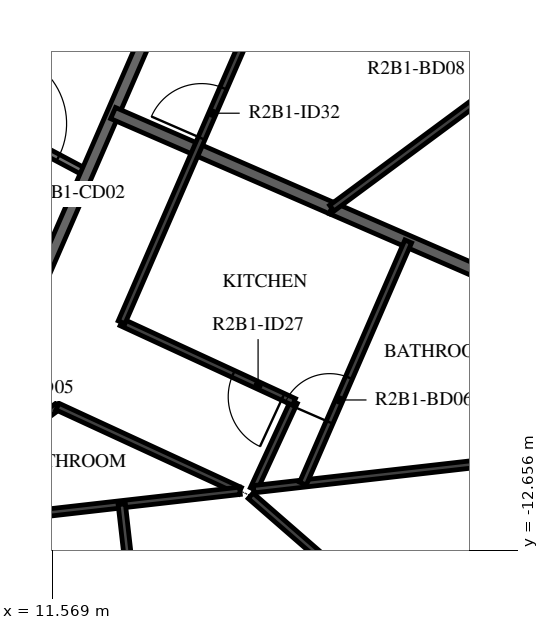
"""IFC4 building model, lengths in metres.
Left out: names, types, materials, properties, quantities, classifications, styles, units other than length and angle.
Written with IfcOpenShell. Run it as: python <this file> out.ifc"""

import sys

from ifc_helpers import new_model, si_unit, direction, frame, frame_2d, origin, place, context, subcontext, project, spatial, rectangle, extrude, element, fill, save


model = new_model("IFC4")
c1 = context("Model", 3, precision=1e-05, world=origin(), true_north=direction((0.0, 1.0)))
c2 = subcontext(c1, "Body", "Model", "MODEL_VIEW")
j1 = project(units=[si_unit("LENGTHUNIT", "METRE"), si_unit("PLANEANGLEUNIT", "RADIAN")], contexts=[c1])
p1 = place(None, origin())
s1 = spatial("IfcSite", under=j1, at=p1, CompositionType="ELEMENT")
p2 = place(p1, origin())
s2 = spatial("IfcBuilding", under=s1, at=p2, CompositionType="ELEMENT")
p3 = place(p2, frame((0.0, 0.0, 87.2)))
s3 = spatial("IfcBuildingStorey", under=s2, at=p3, CompositionType="ELEMENT", Elevation=87.2)
p4 = place(p3, frame((10.858, -4.479, 0.0), z_axis=(0.0, 0.0, 1.0), x_axis=(0.258734743916, 0.965948410781, 0.0)))
e1 = element("IfcWall", 1, at=p4, inside=s3, PredefinedType="SHEAR", context=c2, shape_type="SweptSolid", body=[
    extrude(rectangle(XDim=3.033, YDim=0.5, at=frame_2d((1.516, 0.0))), origin(), (0.0, 0.0, 1.0), 3.12),
])
p5 = place(p3, frame((10.511, -5.589, 0.0), z_axis=(0.0, 0.0, 1.0), x_axis=(0.882962602189, -0.469443333253, 0.0)))
e2 = element("IfcWall", 2, at=p5, inside=s3, PredefinedType="PARTITIONING", context=c2, shape_type="SweptSolid", body=[
    extrude(rectangle(XDim=1.838, YDim=0.12, at=frame_2d((0.919, 0.0))), origin(), (0.0, 0.0, 1.0), 3.12),
])
p6 = place(p5, frame((0.1, 0.0, 0.0)))
e3 = element("IfcOpeningElement", 3, at=p6, cuts=e2, PredefinedType="OPENING", context=c2, shape_type="SweptSolid", body=[
    extrude(rectangle(XDim=1.2, YDim=2.1, at=frame_2d((0.6, 1.05))), frame((0.0, 0.07, 0.0), z_axis=(0.0, -1.0, 0.0), x_axis=(1.0, 0.0, 0.0)), (0.0, 0.0, 1.0), 0.14),
])
p7 = place(p3, frame((11.1, -8.829, 0.0), z_axis=(0.0, 0.0, 1.0), x_axis=(0.398741918631, 0.917063183388, 0.0)))
e4 = element("IfcWall", 4, at=p7, inside=s3, PredefinedType="STANDARD", context=c2, shape_type="SweptSolid", body=[
    extrude(rectangle(XDim=7.342, YDim=0.2, at=frame_2d((3.671, 0.0))), origin(), (0.0, 0.0, 1.0), 3.12),
])
p8 = place(p3, frame((16.16, -7.027, 0.0), z_axis=(0.0, 0.0, 1.0), x_axis=(-0.917065107526, 0.398737493293, 0.0)))
e5 = element("IfcWall", 5, at=p8, inside=s3, PredefinedType="STANDARD", context=c2, shape_type="SweptSolid", body=[
    extrude(rectangle(XDim=3.922, YDim=0.2, at=frame_2d((1.961, 0.0))), origin(), (0.0, 0.0, 1.0), 3.12),
])
p9 = place(p3, frame((19.198, -8.347, 0.0), z_axis=(0.0, 0.0, 1.0), x_axis=(-0.917046616943, 0.398780017495, 0.0)))
e6 = element("IfcWall", 6, at=p9, inside=s3, PredefinedType="STANDARD", context=c2, shape_type="SweptSolid", body=[
    extrude(rectangle(XDim=3.312, YDim=0.2, at=frame_2d((1.656, 0.0))), origin(), (0.0, 0.0, 1.0), 3.12),
])
p10 = place(p3, frame((5.767, -14.641, 0.0), z_axis=(0.0, 0.0, 1.0), x_axis=(0.803867427863, 0.594808505673, 0.0)))
e7 = element("IfcWall", 7, at=p10, inside=s3, PredefinedType="PARTITIONING", context=c2, shape_type="SweptSolid", body=[
    extrude(rectangle(XDim=7.316, YDim=0.12, at=frame_2d((3.658, 0.0))), origin(), (0.0, 0.0, 1.0), 3.12),
])
p11 = place(p10, frame((0.2, 0.0, 0.0)))
e8 = element("IfcOpeningElement", 8, at=p11, cuts=e7, PredefinedType="OPENING", context=c2, shape_type="SweptSolid", body=[
    extrude(rectangle(XDim=0.9, YDim=2.1, at=frame_2d((0.45, 1.05))), frame((0.0, 0.07, 0.0), z_axis=(0.0, -1.0, 0.0), x_axis=(1.0, 0.0, 0.0)), (0.0, 0.0, 1.0), 0.14),
])
p12 = place(p10, frame((5.385, 0.0, 0.0)))
e9 = element("IfcOpeningElement", 9, at=p12, cuts=e7, PredefinedType="OPENING", context=c2, shape_type="SweptSolid", body=[
    extrude(rectangle(XDim=0.8, YDim=2.1, at=frame_2d((0.4, 1.05))), frame((0.0, 0.07, 0.0), z_axis=(0.0, -1.0, 0.0), x_axis=(1.0, 0.0, 0.0)), (0.0, 0.0, 1.0), 0.14),
])
p13 = place(p3, frame((11.649, -10.289, 0.0), z_axis=(0.0, 0.0, 1.0), x_axis=(0.9079269461, -0.419128453514, 0.0)))
e10 = element("IfcWall", 10, at=p13, inside=s3, PredefinedType="PARTITIONING", context=c2, shape_type="SweptSolid", body=[
    extrude(rectangle(XDim=3.304, YDim=0.12, at=frame_2d((1.652, 0.0))), origin(), (0.0, 0.0, 1.0), 3.12),
])
p14 = place(p3, frame((14.875, -11.648, 0.0), z_axis=(0.0, 0.0, 1.0), x_axis=(0.419087543301, 0.90794583046, 0.0)))
e11 = element("IfcWall", 11, at=p14, inside=s3, PredefinedType="PARTITIONING", context=c2, shape_type="SweptSolid", body=[
    extrude(rectangle(XDim=1.582, YDim=0.12, at=frame_2d((0.791, 0.0))), origin(), (0.0, 0.0, 1.0), 3.12),
])
p15 = place(p3, frame((15.538, -10.212, 0.0), z_axis=(0.0, 0.0, 1.0), x_axis=(-0.907941075756, 0.419097844131, 0.0)))
e12 = element("IfcWall", 12, at=p15, inside=s3, PredefinedType="PARTITIONING", context=c2, shape_type="SweptSolid", body=[
    extrude(rectangle(XDim=3.122, YDim=0.12, at=frame_2d((1.561, 0.0))), origin(), (0.0, 0.0, 1.0), 3.12),
])
p16 = place(p15, frame((0.2, 0.0, 0.0)))
e13 = element("IfcOpeningElement", 13, at=p16, cuts=e12, PredefinedType="OPENING", context=c2, shape_type="SweptSolid", body=[
    extrude(rectangle(XDim=0.9, YDim=2.1, at=frame_2d((0.45, 1.05))), frame((0.0, 0.07, 0.0), z_axis=(0.0, -1.0, 0.0), x_axis=(1.0, 0.0, 0.0)), (0.0, 0.0, 1.0), 0.14),
])
p17 = place(p3, frame((12.703, -8.904, 0.0), z_axis=(0.0, 0.0, 1.0), x_axis=(0.398716154453, 0.917074385303, 0.0)))
e14 = element("IfcWall", 14, at=p17, inside=s3, PredefinedType="PARTITIONING", context=c2, shape_type="SweptSolid", body=[
    extrude(rectangle(XDim=7.173, YDim=0.12, at=frame_2d((3.586, 0.0))), origin(), (0.0, 0.0, 1.0), 3.12),
])
p18 = place(p17, frame((3.3, 0.0, 0.0)))
e15 = element("IfcOpeningElement", 15, at=p18, cuts=e14, PredefinedType="OPENING", context=c2, shape_type="SweptSolid", body=[
    extrude(rectangle(XDim=0.9, YDim=2.1, at=frame_2d((0.45, 1.05))), frame((0.0, 0.07, 0.0), z_axis=(0.0, -1.0, 0.0), x_axis=(1.0, 0.0, 0.0)), (0.0, 0.0, 1.0), 0.14),
])
p19 = place(p3, frame((14.649, -11.674, 0.0), z_axis=(0.0, 0.0, 1.0), x_axis=(-0.993573746873, -0.113186613721, 0.0)))
e16 = element("IfcWall", 16, at=p19, inside=s3, PredefinedType="PARTITIONING", context=c2, shape_type="SweptSolid", body=[
    extrude(rectangle(XDim=5.796, YDim=0.12, at=frame_2d((2.898, 0.0))), origin(), (0.0, 0.0, 1.0), 3.12),
])
p20 = place(p3, frame((13.386, -17.857, 0.0), z_axis=(0.0, 0.0, 1.0), x_axis=(-0.113200012983, 0.993572220355, 0.0)))
e17 = element("IfcWall", 17, at=p20, inside=s3, PredefinedType="PARTITIONING", context=c2, shape_type="SweptSolid", body=[
    extrude(rectangle(XDim=6.0, YDim=0.12, at=frame_2d((3.0, 0.0))), origin(), (0.0, 0.0, 1.0), 2.73),
])
p21 = place(p20, frame((0.2, 0.0, 0.0)))
e18 = element("IfcOpeningElement", 18, at=p21, cuts=e17, PredefinedType="OPENING", context=c2, shape_type="SweptSolid", body=[
    extrude(rectangle(XDim=0.9, YDim=2.1, at=frame_2d((0.45, 1.05))), frame((0.0, 0.07, 0.0), z_axis=(0.0, -1.0, 0.0), x_axis=(1.0, 0.0, 0.0)), (0.0, 0.0, 1.0), 0.14),
])
p22 = place(p3, frame((20.856, -17.006, 0.0), z_axis=(0.0, 0.0, 1.0), x_axis=(-0.75423134567, 0.656608770281, 0.0)))
e19 = element("IfcWall", 19, at=p22, inside=s3, PredefinedType="PARTITIONING", context=c2, shape_type="SweptSolid", body=[
    extrude(rectangle(XDim=7.995, YDim=0.12, at=frame_2d((3.998, 0.0))), origin(), (0.0, 0.0, 1.0), 3.12),
])
p23 = place(p22, frame((0.7, 0.0, 0.0)))
e20 = element("IfcOpeningElement", 20, at=p23, cuts=e19, PredefinedType="OPENING", context=c2, shape_type="SweptSolid", body=[
    extrude(rectangle(XDim=0.9, YDim=2.1, at=frame_2d((0.45, 1.05))), frame((0.0, 0.07, 0.0), z_axis=(0.0, -1.0, 0.0), x_axis=(1.0, 0.0, 0.0)), (0.0, 0.0, 1.0), 0.14),
])
p24 = place(p3, frame((20.527, -11.004, 0.0), z_axis=(0.0, 0.0, 1.0), x_axis=(-0.993568869194, -0.113229422712, 0.0)))
e21 = element("IfcWall", 21, at=p24, inside=s3, PredefinedType="PARTITIONING", context=c2, shape_type="SweptSolid", body=[
    extrude(rectangle(XDim=5.688, YDim=0.12, at=frame_2d((2.844, 0.0))), origin(), (0.0, 0.0, 1.0), 3.12),
])
p25 = place(p3, frame((15.686, -11.556, 0.0), z_axis=(0.0, 0.0, 1.0), x_axis=(0.398724055903, 0.917070949951, 0.0)))
e22 = element("IfcWall", 22, at=p25, inside=s3, PredefinedType="PARTITIONING", context=c2, shape_type="SweptSolid", body=[
    extrude(rectangle(XDim=4.343, YDim=0.12, at=frame_2d((2.171, 0.0))), origin(), (0.0, 0.0, 1.0), 3.12),
])
p26 = place(p25, frame((1.1, 0.0, 0.0)))
e23 = element("IfcOpeningElement", 23, at=p26, cuts=e22, PredefinedType="OPENING", context=c2, shape_type="SweptSolid", body=[
    extrude(rectangle(XDim=0.8, YDim=2.1, at=frame_2d((0.4, 1.05))), frame((0.0, 0.07, 0.0), z_axis=(0.0, -1.0, 0.0), x_axis=(1.0, 0.0, 0.0)), (0.0, 0.0, 1.0), 0.14),
])
p27 = place(p3, frame((19.735, -4.382, 0.0), z_axis=(0.0, 0.0, 1.0), x_axis=(-0.803850825108, -0.594830943188, 0.0)))
e24 = element("IfcWall", 24, at=p27, inside=s3, PredefinedType="PARTITIONING", context=c2, shape_type="SweptSolid", body=[
    extrude(rectangle(XDim=4.447, YDim=0.12, at=frame_2d((2.223, 0.0))), origin(), (0.0, 0.0, 1.0), 3.12),
])
p28 = place(p27, frame((0.2, 0.0, 0.0)))
e25 = element("IfcOpeningElement", 25, at=p28, cuts=e24, PredefinedType="OPENING", context=c2, shape_type="SweptSolid", body=[
    extrude(rectangle(XDim=0.8, YDim=2.1, at=frame_2d((0.4, 1.05))), frame((0.0, 0.07, 0.0), z_axis=(0.0, -1.0, 0.0), x_axis=(1.0, 0.0, 0.0)), (0.0, 0.0, 1.0), 0.14),
])
p29 = place(p16, origin())
e26 = element("IfcDoor", 26, at=p29, inside=s3, OperationType="SINGLE_SWING_LEFT", PredefinedType="DOOR", context=c2, shape_type="SweptSolid", body=[
    extrude(rectangle(XDim=0.9, YDim=2.1, at=frame_2d((0.45, 1.05))), frame((0.0, 0.025, 0.0), z_axis=(0.0, -1.0, 0.0), x_axis=(1.0, 0.0, 0.0)), (0.0, 0.0, 1.0), 0.05),
])
fill(e13, e26)
p30 = place(p26, origin())
e27 = element("IfcDoor", 27, at=p30, inside=s3, OperationType="SINGLE_SWING_RIGHT", PredefinedType="DOOR", context=c2, shape_type="SweptSolid", body=[
    extrude(rectangle(XDim=0.8, YDim=2.1, at=frame_2d((0.4, 1.05))), frame((0.0, 0.025, 0.0), z_axis=(0.0, -1.0, 0.0), x_axis=(1.0, 0.0, 0.0)), (0.0, 0.0, 1.0), 0.05),
])
fill(e23, e27)
p31 = place(p18, origin())
e28 = element("IfcDoor", 28, at=p31, inside=s3, OperationType="SINGLE_SWING_RIGHT", PredefinedType="DOOR", context=c2, shape_type="SweptSolid", body=[
    extrude(rectangle(XDim=0.9, YDim=2.1, at=frame_2d((0.45, 1.05))), frame((0.0, 0.025, 0.0), z_axis=(0.0, -1.0, 0.0), x_axis=(1.0, 0.0, 0.0)), (0.0, 0.0, 1.0), 0.05),
])
fill(e15, e28)
p32 = place(p6, origin())
e29 = element("IfcDoor", 29, at=p32, inside=s3, OperationType="DOUBLE_DOOR_SINGLE_SWING", PredefinedType="DOOR", context=c2, shape_type="SweptSolid", body=[
    extrude(rectangle(XDim=1.2, YDim=2.1, at=frame_2d((0.6, 1.05))), frame((0.0, 0.025, 0.0), z_axis=(0.0, -1.0, 0.0), x_axis=(1.0, 0.0, 0.0)), (0.0, 0.0, 1.0), 0.05),
])
fill(e3, e29)
save(model, sys.argv[1])
